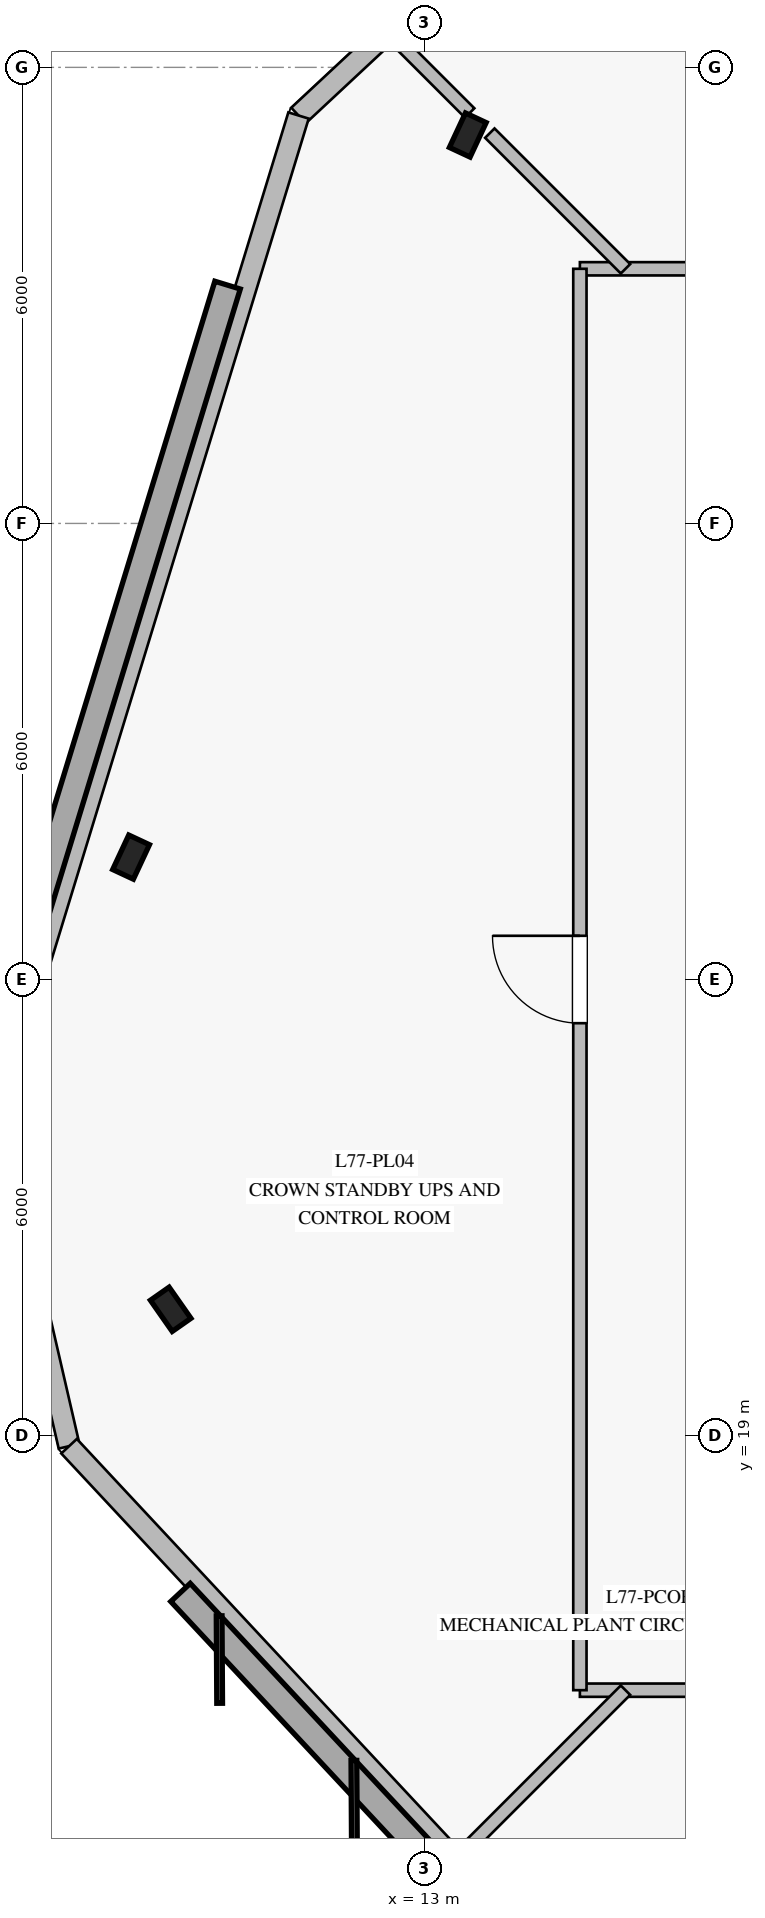
"""IFC4 building model, lengths in metres.
Left out: names, types, materials, properties, quantities, classifications, styles, units other than length and angle.
Written with IfcOpenShell. Run it as: python <this file> out.ifc"""

import sys

from ifc_helpers import new_model, si_unit, direction, frame, frame_2d, origin, origin_2d, place, context, subcontext, project, spatial, rectangle, i_section, extrude, element, fill, save


model = new_model("IFC4")
c1 = context("Model", 3, precision=1e-05, world=origin(), true_north=direction((0.0, 1.0)))
c2 = subcontext(c1, "Body", "Model", "MODEL_VIEW")
j1 = project(units=[si_unit("LENGTHUNIT", "METRE"), si_unit("PLANEANGLEUNIT", "RADIAN")], contexts=[c1])
p1 = place(None, origin())
s1 = spatial("IfcSite", under=j1, at=p1, CompositionType="ELEMENT")
p2 = place(p1, origin())
s2 = spatial("IfcBuilding", under=s1, at=p2, CompositionType="ELEMENT")
p3 = place(p2, frame((0.0, 0.0, 318.2)))
s3 = spatial("IfcBuildingStorey", under=s2, at=p3, CompositionType="ELEMENT", Elevation=318.2)
for number, where, z_axis, x_axis in (
    (1, (13.575, 36.11, 0.0), (0.0, 0.0, 1.0), (0.423, 0.906, 0.0)),
    (2, (9.145, 26.61, 0.0), (0.0, 0.0, 1.0), (0.423, 0.906, 0.0)),
    (3, (9.666, 20.661, 0.0), (0.0, 0.0, 1.0), (-0.574, 0.819, 0.0)),
):
    element("IfcColumn", number, at=place(p3, frame(where, z_axis=z_axis, x_axis=x_axis)), inside=s3, PredefinedType="COLUMN", context=c2, shape_type="SweptSolid", body=[
        extrude(i_section(OverallWidth=0.3, OverallDepth=0.5, WebThickness=0.014, FlangeThickness=0.028, at=origin_2d()), origin(), (0.0, 0.0, 1.0), 4.4),
    ])
p4 = place(p3, frame((14.613, 39.412, 0.0), z_axis=(0.0, 0.0, 1.0), x_axis=(-0.731311609652, -0.682043495378, 0.0)))
e4 = element("IfcWall", 4, at=p4, inside=s3, PredefinedType="STANDARD", context=c2, shape_type="SweptSolid", body=[
    extrude(rectangle(XDim=4.465, YDim=0.28, at=frame_2d((2.232, 0.0))), origin(), (0.0, 0.0, 1.0), 4.14),
])
p5 = place(p3, frame((11.348, 36.367, 0.0), z_axis=(0.0, 0.0, 1.0), x_axis=(-0.292402016217, -0.956295488284, 0.0)))
e5 = element("IfcWall", 5, at=p5, inside=s3, PredefinedType="STANDARD", context=c2, shape_type="SweptSolid", body=[
    extrude(rectangle(XDim=13.758, YDim=0.28, at=frame_2d((6.879, 0.0))), origin(), (0.0, 0.0, 1.0), 4.14),
])
p6 = place(p3, frame((7.325, 23.21, 0.0), z_axis=(0.0, 0.0, 1.0), x_axis=(0.22493139919, -0.974374602326, 0.0)))
e6 = element("IfcWall", 6, at=p6, inside=s3, PredefinedType="STANDARD", context=c2, shape_type="SweptSolid", body=[
    extrude(rectangle(XDim=4.464, YDim=0.28, at=frame_2d((2.232, 0.0))), origin(), (0.0, 0.0, 1.0), 4.14),
])
p7 = place(p3, frame((8.329, 18.86, 0.0), z_axis=(0.0, 0.0, 1.0), x_axis=(0.682027341853, -0.731326674588, 0.0)))
e7 = element("IfcWall", 7, at=p7, inside=s3, PredefinedType="STANDARD", context=c2, shape_type="SweptSolid", body=[
    extrude(rectangle(XDim=13.757, YDim=0.28, at=frame_2d((6.879, 0.0))), origin(), (0.0, 0.0, 1.0), 4.14),
])
p8 = place(p3, frame((15.05, 34.35, 0.0), z_axis=(0.0, 0.0, 1.0), x_axis=(1.0, 0.0, 0.0)))
e8 = element("IfcWall", 8, at=p8, inside=s3, PredefinedType="PARTITIONING", context=c2, shape_type="SweptSolid", body=[
    extrude(rectangle(XDim=19.9, YDim=0.175, at=frame_2d((9.95, 0.0))), origin(), (0.0, 0.0, 1.0), 3.64),
])
p9 = place(p8, frame((9.285, 0.0, 0.0)))
e9 = element("IfcOpeningElement", 9, at=p9, cuts=e8, PredefinedType="OPENING", context=c2, shape_type="SweptSolid", body=[
    extrude(rectangle(XDim=1.15, YDim=2.2, at=frame_2d((0.575, 1.1))), frame((0.0, 0.098, 0.0), z_axis=(0.0, -1.0, 0.0), x_axis=(1.0, 0.0, 0.0)), (0.0, 0.0, 1.0), 0.195),
])
p10 = place(p3, frame((34.95, 15.65, 0.0), z_axis=(0.0, 0.0, 1.0), x_axis=(-1.0, 0.0, 0.0)))
e10 = element("IfcWall", 10, at=p10, inside=s3, PredefinedType="PARTITIONING", context=c2, shape_type="SweptSolid", body=[
    extrude(rectangle(XDim=19.9, YDim=0.175, at=frame_2d((9.95, 0.0))), origin(), (0.0, 0.0, 1.0), 3.64),
])
p11 = place(p10, frame((9.285, 0.0, 0.0)))
e11 = element("IfcOpeningElement", 11, at=p11, cuts=e10, PredefinedType="OPENING", context=c2, shape_type="SweptSolid", body=[
    extrude(rectangle(XDim=1.15, YDim=2.2, at=frame_2d((0.575, 1.1))), frame((0.0, 0.098, 0.0), z_axis=(0.0, -1.0, 0.0), x_axis=(1.0, 0.0, 0.0)), (0.0, 0.0, 1.0), 0.195),
])
p12 = place(p3, frame((15.05, 15.65, 0.0), z_axis=(0.0, 0.0, 1.0), x_axis=(0.0, 1.0, 0.0)))
e12 = element("IfcWall", 12, at=p12, inside=s3, PredefinedType="PARTITIONING", context=c2, shape_type="SweptSolid", body=[
    extrude(rectangle(XDim=18.7, YDim=0.175, at=frame_2d((9.35, 0.0))), origin(), (0.0, 0.0, 1.0), 3.64),
])
p13 = place(p12, frame((8.775, 0.0, 0.0)))
e13 = element("IfcOpeningElement", 13, at=p13, cuts=e12, PredefinedType="OPENING", context=c2, shape_type="SweptSolid", body=[
    extrude(rectangle(XDim=1.15, YDim=2.2, at=frame_2d((0.575, 1.1))), frame((0.0, 0.098, 0.0), z_axis=(0.0, -1.0, 0.0), x_axis=(1.0, 0.0, 0.0)), (0.0, 0.0, 1.0), 0.195),
])
p14 = place(p3, frame((15.65, 34.35, 0.0), z_axis=(0.0, 0.0, 1.0), x_axis=(-0.707106781187, 0.707106781187, 0.0)))
e14 = element("IfcWall", 14, at=p14, inside=s3, PredefinedType="PARTITIONING", context=c2, shape_type="SweptSolid", body=[
    extrude(rectangle(XDim=2.524, YDim=0.175, at=frame_2d((1.262, 0.0))), origin(), (0.0, 0.0, 1.0), 3.64),
])
p15 = place(p3, frame((13.6, 36.4, 0.0), z_axis=(0.0, 0.0, 1.0), x_axis=(-0.707106781187, 0.707106781187, 0.0)))
e15 = element("IfcWall", 15, at=p15, inside=s3, PredefinedType="PARTITIONING", context=c2, shape_type="SweptSolid", body=[
    extrude(rectangle(XDim=1.453, YDim=0.175, at=frame_2d((0.726, 0.0))), origin(), (0.0, 0.0, 1.0), 3.64),
])
p16 = place(p3, frame((15.65, 15.65, 0.0), z_axis=(0.0, 0.0, 1.0), x_axis=(-0.707106781187, -0.707106781187, 0.0)))
e16 = element("IfcWall", 16, at=p16, inside=s3, PredefinedType="PARTITIONING", context=c2, shape_type="SweptSolid", body=[
    extrude(rectangle(XDim=3.096, YDim=0.175, at=frame_2d((1.548, 0.0))), origin(), (0.0, 0.0, 1.0), 3.64),
])
p17 = place(p13, origin())
e17 = element("IfcDoor", 17, at=p17, inside=s3, OperationType="SINGLE_SWING_RIGHT", PredefinedType="DOOR", context=c2, shape_type="SweptSolid", body=[
    extrude(rectangle(XDim=1.15, YDim=2.2, at=frame_2d((0.575, 1.1))), frame((0.0, 0.025, 0.0), z_axis=(0.0, -1.0, 0.0), x_axis=(1.0, 0.0, 0.0)), (0.0, 0.0, 1.0), 0.05),
])
fill(e13, e17)
save(model, sys.argv[1])
